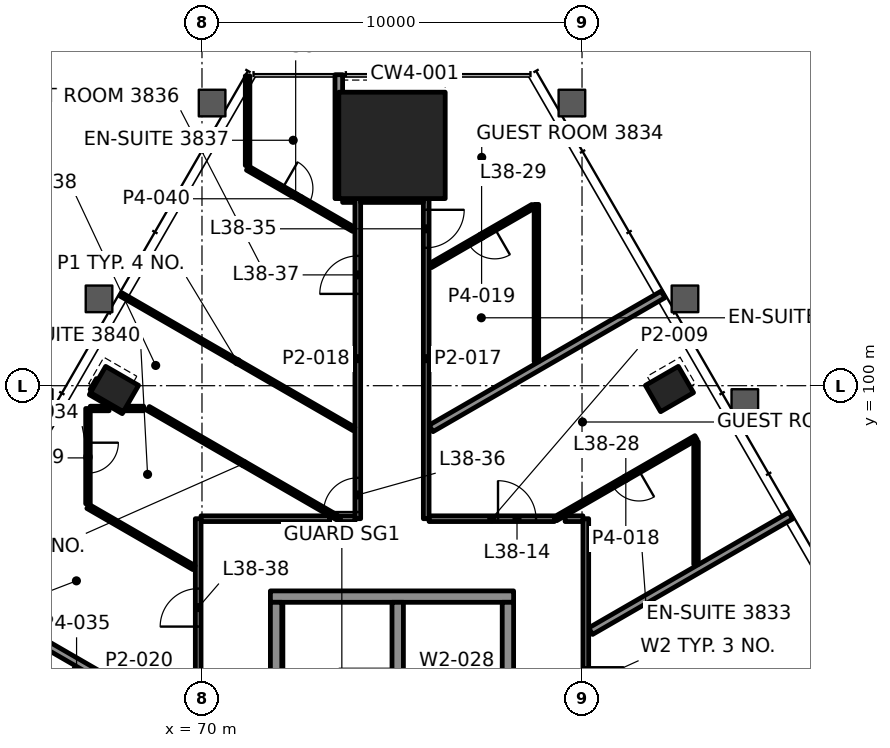
"""IFC4 building model, lengths in metres.
Left out: names, types, materials, properties, quantities, classifications, styles, units other than length and angle.
Written with IfcOpenShell. Run it as: python <this file> out.ifc"""

import sys

from ifc_helpers import new_model, si_unit, direction, frame, frame_2d, origin, origin_2d, place, context, subcontext, project, spatial, rectangle, hollow_rectangle, extrude, element, fill, save


model = new_model("IFC4")
c1 = context("Model", 3, precision=1e-05, world=origin(), true_north=direction((0.0, 1.0)))
c2 = subcontext(c1, "Body", "Model", "MODEL_VIEW")
j1 = project(units=[si_unit("LENGTHUNIT", "METRE"), si_unit("PLANEANGLEUNIT", "RADIAN")], contexts=[c1])
p1 = place(None, origin())
s1 = spatial("IfcSite", under=j1, at=p1, CompositionType="ELEMENT")
p2 = place(p1, origin())
s2 = spatial("IfcBuilding", under=s1, at=p2, CompositionType="ELEMENT")
p3 = place(p2, frame((0.0, 0.0, 167.5)))
s3 = spatial("IfcBuildingStorey", under=s2, at=p3, CompositionType="ELEMENT", Elevation=167.5)
p4 = place(p3, frame((75.0, 106.323, 0.0), z_axis=(0.0, 0.0, 1.0), x_axis=(-1.0, 0.0, 0.0)))
e1 = element("IfcColumn", 1, at=p4, inside=s3, PredefinedType="COLUMN", context=c2, shape_type="SweptSolid", body=[
    extrude(rectangle(XDim=2.8, YDim=2.8, at=origin_2d()), origin(), (0.0, 0.0, 1.0), 3.9),
])
for number, where, z_axis, x_axis in (
    (2, (82.302, 99.912, -0.0), (0.0, 0.0, 1.0), (-0.5, 0.866, 0.0)),
    (3, (67.698, 99.912, -0.0), (0.0, 0.0, 1.0), (-0.5, -0.866, 0.0)),
):
    element("IfcColumn", number, at=place(p3, frame(where, z_axis=z_axis, x_axis=x_axis)), inside=s3, PredefinedType="COLUMN", context=c2, shape_type="SweptSolid", body=[
        extrude(hollow_rectangle(XDim=0.8, YDim=1.0, WallThickness=0.05, at=origin_2d()), origin(), (0.0, 0.0, 1.0), 3.9),
    ])
p5 = place(p3, frame((71.8, 94.45, 0.0), z_axis=(0.0, 0.0, 1.0), x_axis=(1.0, 0.0, 0.0)))
e4 = element("IfcWall", 4, at=p5, inside=s3, PredefinedType="SHEAR", context=c2, shape_type="SweptSolid", body=[
    extrude(rectangle(XDim=6.4, YDim=0.3, at=frame_2d((3.2, 0.0))), origin(), (0.0, 0.0, 1.0), 3.7),
])
for number, where, z_axis, x_axis in (
    (5, (71.95, 88.1, 0.0), (0.0, 0.0, 1.0), (0.0, 1.0, 0.0)),
    (6, (78.05, 88.1, 0.0), (0.0, 0.0, 1.0), (0.0, 1.0, 0.0)),
):
    element("IfcWall", number, at=place(p3, frame(where, z_axis=z_axis, x_axis=x_axis)), inside=s3, PredefinedType="SHEAR", context=c2, shape_type="SweptSolid", body=[
        extrude(rectangle(XDim=6.2, YDim=0.3, at=frame_2d((3.1, 0.0))), origin(), (0.0, 0.0, 1.0), 3.7),
    ])
p6 = place(p3, frame((75.15, 88.1, 0.0), z_axis=(0.0, 0.0, 1.0), x_axis=(0.0, 1.0, 0.0)))
e7 = element("IfcWall", 7, at=p6, inside=s3, PredefinedType="SHEAR", context=c2, shape_type="SweptSolid", body=[
    extrude(rectangle(XDim=6.2, YDim=0.3, at=frame_2d((3.1, 0.0))), origin(), (0.0, 0.0, 1.0), 3.7),
])
p7 = place(p6, frame((0.185, 0.0, 0.0)))
e8 = element("IfcOpeningElement", 8, at=p7, cuts=e7, PredefinedType="OPENING", context=c2, shape_type="SweptSolid", body=[
    extrude(rectangle(XDim=1.0, YDim=2.1, at=frame_2d((0.5, 1.05))), frame((0.0, 0.16, 0.0), z_axis=(0.0, -1.0, 0.0), x_axis=(1.0, 0.0, 0.0)), (0.0, 0.0, 1.0), 0.32),
])
p8 = place(p3, frame((69.975, 96.5, 0.0), z_axis=(0.0, 0.0, 1.0), x_axis=(1.0, 0.0, 0.0)))
e9 = element("IfcWall", 9, at=p8, inside=s3, PredefinedType="PARTITIONING", context=c2, shape_type="SweptSolid", body=[
    extrude(rectangle(XDim=3.384, YDim=0.15, at=frame_2d((1.692, 0.0))), origin(), (0.0, 0.0, 1.0), 3.1),
])
p9 = place(p3, frame((75.975, 96.5, 0.0), z_axis=(0.0, 0.0, 1.0), x_axis=(1.0, 0.0, 0.0)))
e10 = element("IfcWall", 10, at=p9, inside=s3, PredefinedType="PARTITIONING", context=c2, shape_type="SweptSolid", body=[
    extrude(rectangle(XDim=3.299, YDim=0.15, at=frame_2d((1.649, 0.0))), origin(), (0.0, 0.0, 1.0), 3.1),
])
p10 = place(p9, frame((1.814, 0.0, 0.0)))
e11 = element("IfcOpeningElement", 11, at=p10, cuts=e10, PredefinedType="OPENING", context=c2, shape_type="SweptSolid", body=[
    extrude(rectangle(XDim=1.0, YDim=2.1, at=frame_2d((0.5, 1.05))), frame((0.0, 0.085, 0.0), z_axis=(0.0, -1.0, 0.0), x_axis=(1.0, 0.0, 0.0)), (0.0, 0.0, 1.0), 0.17),
])
p11 = place(p3, frame((67.06, 99.4, 0.0), z_axis=(0.0, 0.0, 1.0), x_axis=(1.0, 0.0, 0.0)))
e12 = element("IfcWall", 12, at=p11, inside=s3, PredefinedType="PARTITIONING", context=c2, shape_type="SweptSolid", body=[
    extrude(rectangle(XDim=0.496, YDim=0.12, at=frame_2d((0.248, 0.0))), origin(), (0.0, 0.0, 1.0), 3.022),
])
p12 = place(p3, frame((67.98, 99.4, 0.0), z_axis=(0.0, 0.0, 1.0), x_axis=(1.0, 0.0, 0.0)))
e13 = element("IfcWall", 13, at=p12, inside=s3, PredefinedType="PARTITIONING", context=c2, shape_type="SweptSolid", body=[
    extrude(rectangle(XDim=0.486, YDim=0.12, at=frame_2d((0.243, 0.0))), origin(), (0.0, 0.0, 1.0), 3.1),
])
p13 = place(p3, frame((73.7, 104.923, 0.0), z_axis=(0.0, 0.0, 1.0), x_axis=(1.0, 0.0, 0.0)))
e14 = element("IfcWall", 14, at=p13, inside=s3, PredefinedType="PARTITIONING", context=c2, shape_type="SweptSolid", body=[
    extrude(rectangle(XDim=0.324, YDim=0.2, at=frame_2d((0.162, 0.0))), origin(), (0.0, 0.0, 1.0), 3.1),
])
p14 = place(p3, frame((80.227, 93.541, 0.0), z_axis=(0.0, 0.0, 1.0), x_axis=(0.866033863416, 0.499985347202, 0.0)))
e15 = element("IfcWall", 15, at=p14, inside=s3, PredefinedType="PARTITIONING", context=c2, shape_type="SweptSolid", body=[
    extrude(rectangle(XDim=6.083, YDim=0.2, at=frame_2d((3.042, 0.0))), origin(), (0.0, 0.0, 1.0), 3.022),
])
p15 = place(p3, frame((83.0, 98.634, 0.0), z_axis=(0.0, 0.0, 1.0), x_axis=(-0.866013160285, -0.500021205763, 0.0)))
e16 = element("IfcWall", 16, at=p15, inside=s3, PredefinedType="PARTITIONING", context=c2, shape_type="SweptSolid", body=[
    extrude(rectangle(XDim=4.268, YDim=0.12, at=frame_2d((2.134, 0.0))), origin(), (0.0, 0.0, 1.0), 3.022),
])
p16 = place(p15, frame((1.734, 0.0, 0.0)))
e17 = element("IfcOpeningElement", 17, at=p16, cuts=e16, PredefinedType="OPENING", context=c2, shape_type="SweptSolid", body=[
    extrude(rectangle(XDim=0.8, YDim=2.1, at=frame_2d((0.4, 1.05))), frame((0.0, 0.07, 0.0), z_axis=(0.0, -1.0, 0.0), x_axis=(1.0, 0.0, 0.0)), (0.0, 0.0, 1.0), 0.14),
])
p17 = place(p3, frame((76.027, 98.876, 0.0), z_axis=(0.0, 0.0, 1.0), x_axis=(0.86602299963, 0.500004164094, 0.0)))
e18 = element("IfcWall", 18, at=p17, inside=s3, PredefinedType="PARTITIONING", context=c2, shape_type="SweptSolid", body=[
    extrude(rectangle(XDim=7.052, YDim=0.2, at=frame_2d((3.526, 0.0))), origin(), (0.0, 0.0, 1.0), 3.1),
])
p18 = place(p3, frame((78.705, 104.716, 0.0), z_axis=(0.0, 0.0, 1.0), x_axis=(-0.866028856698, -0.499994019331, 0.0)))
e19 = element("IfcWall", 19, at=p18, inside=s3, PredefinedType="PARTITIONING", context=c2, shape_type="SweptSolid", body=[
    extrude(rectangle(XDim=3.113, YDim=0.12, at=frame_2d((1.556, 0.0))), origin(), (0.0, 0.0, 1.0), 3.1),
])
p19 = place(p18, frame((1.156, 0.0, 0.0)))
e20 = element("IfcOpeningElement", 20, at=p19, cuts=e19, PredefinedType="OPENING", context=c2, shape_type="SweptSolid", body=[
    extrude(rectangle(XDim=0.8, YDim=2.1, at=frame_2d((0.4, 1.05))), frame((0.0, 0.07, 0.0), z_axis=(0.0, -1.0, 0.0), x_axis=(1.0, 0.0, 0.0)), (0.0, 0.0, 1.0), 0.14),
])
p20 = place(p3, frame((67.1, 99.877, 0.0), z_axis=(0.0, 0.0, 1.0), x_axis=(0.500277597875, 0.865865073245, 0.0)))
e21 = element("IfcWall", 21, at=p20, inside=s3, PredefinedType="PARTITIONING", context=c2, shape_type="SweptSolid", body=[
    extrude(rectangle(XDim=0.33, YDim=0.1, at=frame_2d((0.165, 0.0))), origin(), (0.0, 0.0, 1.0), 3.1),
])
p21 = place(p3, frame((83.0, 95.297, 0.0), z_axis=(0.0, 0.0, 1.0), x_axis=(0.0, 1.0, 0.0)))
e22 = element("IfcWall", 22, at=p21, inside=s3, PredefinedType="PARTITIONING", context=c2, shape_type="SweptSolid", body=[
    extrude(rectangle(XDim=3.228, YDim=0.12, at=frame_2d((1.614, 0.0))), origin(), (0.0, 0.0, 1.0), 3.022),
])
p22 = place(p3, frame((80.1, 96.5, 0.0), z_axis=(0.0, 0.0, 1.0), x_axis=(0.0, -1.0, 0.0)))
e23 = element("IfcWall", 23, at=p22, inside=s3, PredefinedType="PARTITIONING", context=c2, shape_type="SweptSolid", body=[
    extrude(rectangle(XDim=10.6, YDim=0.15, at=frame_2d((5.3, 0.0))), origin(), (0.0, 0.0, 1.0), 3.022),
])
p23 = place(p22, frame((3.909, 0.0, 0.0)))
e24 = element("IfcOpeningElement", 24, at=p23, cuts=e23, PredefinedType="OPENING", context=c2, shape_type="SweptSolid", body=[
    extrude(rectangle(XDim=1.0, YDim=2.1, at=frame_2d((0.5, 1.05))), frame((0.0, 0.085, 0.0), z_axis=(0.0, -1.0, 0.0), x_axis=(1.0, 0.0, 0.0)), (0.0, 0.0, 1.0), 0.17),
])
p24 = place(p3, frame((78.8, 100.633, 0.0), z_axis=(0.0, 0.0, 1.0), x_axis=(0.0, 1.0, 0.0)))
e25 = element("IfcWall", 25, at=p24, inside=s3, PredefinedType="PARTITIONING", context=c2, shape_type="SweptSolid", body=[
    extrude(rectangle(XDim=4.137, YDim=0.12, at=frame_2d((2.069, 0.0))), origin(), (0.0, 0.0, 1.0), 3.1),
])
p25 = place(p3, frame((75.9, 104.923, 0.0), z_axis=(0.0, 0.0, 1.0), x_axis=(0.0, -1.0, 0.0)))
e26 = element("IfcWall", 26, at=p25, inside=s3, PredefinedType="PARTITIONING", context=c2, shape_type="SweptSolid", body=[
    extrude(rectangle(XDim=8.423, YDim=0.15, at=frame_2d((4.211, 0.0))), origin(), (0.0, 0.0, 1.0), 3.1),
])
p26 = place(p25, frame((0.294, 0.0, 0.0)))
e27 = element("IfcOpeningElement", 27, at=p26, cuts=e26, PredefinedType="OPENING", context=c2, shape_type="SweptSolid", body=[
    extrude(rectangle(XDim=1.0, YDim=2.1, at=frame_2d((0.5, 1.05))), frame((0.0, 0.085, 0.0), z_axis=(0.0, -1.0, 0.0), x_axis=(1.0, 0.0, 0.0)), (0.0, 0.0, 1.0), 0.17),
])
p27 = place(p3, frame((74.1, 96.5, 0.0), z_axis=(0.0, 0.0, 1.0), x_axis=(0.0, 1.0, 0.0)))
e28 = element("IfcWall", 28, at=p27, inside=s3, PredefinedType="PARTITIONING", context=c2, shape_type="SweptSolid", body=[
    extrude(rectangle(XDim=8.424, YDim=0.15, at=frame_2d((4.212, 0.0))), origin(), (0.0, 0.0, 1.0), 3.1),
])
p28 = place(p27, frame((0.175, 0.0, 0.0)))
e29 = element("IfcOpeningElement", 29, at=p28, cuts=e28, PredefinedType="OPENING", context=c2, shape_type="SweptSolid", body=[
    extrude(rectangle(XDim=0.9, YDim=2.1, at=frame_2d((0.45, 1.05))), frame((0.0, 0.085, 0.0), z_axis=(0.0, -1.0, 0.0), x_axis=(1.0, 0.0, 0.0)), (0.0, 0.0, 1.0), 0.17),
])
p29 = place(p27, frame((5.916, 0.0, 0.0)))
e30 = element("IfcOpeningElement", 30, at=p29, cuts=e28, PredefinedType="OPENING", context=c2, shape_type="SweptSolid", body=[
    extrude(rectangle(XDim=1.0, YDim=2.1, at=frame_2d((0.5, 1.05))), frame((0.0, 0.085, 0.0), z_axis=(0.0, -1.0, 0.0), x_axis=(1.0, 0.0, 0.0)), (0.0, 0.0, 1.0), 0.17),
])
p30 = place(p3, frame((73.6, 104.924, 0.0), z_axis=(0.0, 0.0, 1.0), x_axis=(0.0, 1.0, 0.0)))
e31 = element("IfcWall", 31, at=p30, inside=s3, PredefinedType="PARTITIONING", context=c2, shape_type="SweptSolid", body=[
    extrude(rectangle(XDim=3.26, YDim=0.2, at=frame_2d((1.63, 0.0))), origin(), (0.0, 0.0, 1.0), 3.1),
])
p31 = place(p3, frame((71.2, 105.794, 0.0), z_axis=(0.0, 0.0, 1.0), x_axis=(0.0, 1.0, 0.0)))
e32 = element("IfcWall", 32, at=p31, inside=s3, PredefinedType="PARTITIONING", context=c2, shape_type="SweptSolid", body=[
    extrude(rectangle(XDim=2.36, YDim=0.12, at=frame_2d((1.18, 0.0))), origin(), (0.0, 0.0, 1.0), 3.1),
])
p32 = place(p3, frame((69.9, 85.9, 0.0), z_axis=(0.0, 0.0, 1.0), x_axis=(0.0, 1.0, 0.0)))
e33 = element("IfcWall", 33, at=p32, inside=s3, PredefinedType="PARTITIONING", context=c2, shape_type="SweptSolid", body=[
    extrude(rectangle(XDim=10.6, YDim=0.15, at=frame_2d((5.3, 0.0))), origin(), (0.0, 0.0, 1.0), 3.022),
])
p33 = place(p32, frame((7.76, 0.0, 0.0)))
e34 = element("IfcOpeningElement", 34, at=p33, cuts=e33, PredefinedType="OPENING", context=c2, shape_type="SweptSolid", body=[
    extrude(rectangle(XDim=1.0, YDim=2.1, at=frame_2d((0.5, 1.05))), frame((0.0, 0.085, 0.0), z_axis=(0.0, -1.0, 0.0), x_axis=(1.0, 0.0, 0.0)), (0.0, 0.0, 1.0), 0.17),
])
p34 = place(p3, frame((67.0, 99.4, 0.0), z_axis=(0.0, 0.0, 1.0), x_axis=(0.0, -1.0, 0.0)))
e35 = element("IfcWall", 35, at=p34, inside=s3, PredefinedType="PARTITIONING", context=c2, shape_type="SweptSolid", body=[
    extrude(rectangle(XDim=2.508, YDim=0.12, at=frame_2d((1.254, 0.0))), origin(), (0.0, 0.0, 1.0), 3.022),
])
p35 = place(p34, frame((0.9, 0.0, 0.0)))
e36 = element("IfcOpeningElement", 36, at=p35, cuts=e35, PredefinedType="OPENING", context=c2, shape_type="SweptSolid", body=[
    extrude(rectangle(XDim=0.8, YDim=2.1, at=frame_2d((0.4, 1.05))), frame((0.0, 0.07, 0.0), z_axis=(0.0, -1.0, 0.0), x_axis=(1.0, 0.0, 0.0)), (0.0, 0.0, 1.0), 0.14),
])
p36 = place(p3, frame((66.7, 92.572, 0.0), z_axis=(0.0, 0.0, 1.0), x_axis=(0.0, -1.0, 0.0)))
e37 = element("IfcWall", 37, at=p36, inside=s3, PredefinedType="PARTITIONING", context=c2, shape_type="SweptSolid", body=[
    extrude(rectangle(XDim=2.104, YDim=0.12, at=frame_2d((1.052, 0.0))), origin(), (0.0, 0.0, 1.0), 3.1),
])
p37 = place(p36, frame((0.652, 0.0, 0.0)))
e38 = element("IfcOpeningElement", 38, at=p37, cuts=e37, PredefinedType="OPENING", context=c2, shape_type="SweptSolid", body=[
    extrude(rectangle(XDim=0.8, YDim=2.1, at=frame_2d((0.4, 1.05))), frame((0.0, 0.07, 0.0), z_axis=(0.0, -1.0, 0.0), x_axis=(1.0, 0.0, 0.0)), (0.0, 0.0, 1.0), 0.14),
])
p38 = place(p3, frame((71.2, 105.724, 0.0), z_axis=(0.0, 0.0, 1.0), x_axis=(0.86604299788, -0.499969524894, 0.0)))
e39 = element("IfcWall", 39, at=p38, inside=s3, PredefinedType="PARTITIONING", context=c2, shape_type="SweptSolid", body=[
    extrude(rectangle(XDim=3.222, YDim=0.12, at=frame_2d((1.611, 0.0))), origin(), (0.0, 0.0, 1.0), 3.1),
])
p39 = place(p38, frame((1.061, 0.0, 0.0)))
e40 = element("IfcOpeningElement", 40, at=p39, cuts=e39, PredefinedType="OPENING", context=c2, shape_type="SweptSolid", body=[
    extrude(rectangle(XDim=0.8, YDim=2.1, at=frame_2d((0.4, 1.05))), frame((0.0, 0.07, 0.0), z_axis=(0.0, -1.0, 0.0), x_axis=(1.0, 0.0, 0.0)), (0.0, 0.0, 1.0), 0.14),
])
p40 = place(p3, frame((73.999, 98.862, 0.0), z_axis=(0.0, 0.0, 1.0), x_axis=(-0.866025982437, 0.499998997742, 0.0)))
e41 = element("IfcWall", 41, at=p40, inside=s3, PredefinedType="PARTITIONING", context=c2, shape_type="SweptSolid", body=[
    extrude(rectangle(XDim=7.082, YDim=0.1, at=frame_2d((3.541, 0.0))), origin(), (0.0, 0.0, 1.0), 3.1),
])
p41 = place(p3, frame((73.609, 96.5, 0.0), z_axis=(0.0, 0.0, 1.0), x_axis=(-0.866032775405, 0.499987231761, 0.0)))
e42 = element("IfcWall", 42, at=p41, inside=s3, PredefinedType="PARTITIONING", context=c2, shape_type="SweptSolid", body=[
    extrude(rectangle(XDim=5.8, YDim=0.12, at=frame_2d((2.9, 0.0))), origin(), (0.0, 0.0, 1.0), 3.1),
])
p42 = place(p3, frame((67.932, 99.316, 0.0), z_axis=(0.0, 0.0, 1.0), x_axis=(-0.866010750942, 0.50002537861, 0.0)))
e43 = element("IfcWall", 43, at=p42, inside=s3, PredefinedType="PARTITIONING", context=c2, shape_type="SweptSolid", body=[
    extrude(rectangle(XDim=1.0, YDim=0.12, at=frame_2d((0.5, 0.0))), origin(), (0.0, 0.0, 1.0), 3.022),
])
p43 = place(p3, frame((69.79, 95.212, 0.0), z_axis=(0.0, 0.0, 1.0), x_axis=(-0.86604299788, 0.499969524894, 0.0)))
e44 = element("IfcWall", 44, at=p43, inside=s3, PredefinedType="PARTITIONING", context=c2, shape_type="SweptSolid", body=[
    extrude(rectangle(XDim=3.222, YDim=0.12, at=frame_2d((1.611, 0.0))), origin(), (0.0, 0.0, 1.0), 3.1),
])
p44 = place(p3, frame((69.773, 90.953, 0.0), z_axis=(0.0, 0.0, 1.0), x_axis=(-0.866016371538, 0.500015643983, 0.0)))
e45 = element("IfcWall", 45, at=p44, inside=s3, PredefinedType="PARTITIONING", context=c2, shape_type="SweptSolid", body=[
    extrude(rectangle(XDim=7.376, YDim=0.2, at=frame_2d((3.688, 0.0))), origin(), (0.0, 0.0, 1.0), 3.022),
])
p45 = place(p3, frame((73.639, 96.5, 0.0), z_axis=(0.0, 0.0, 1.0), x_axis=(1.0, 0.0, 0.0)))
e46 = element("IfcWall", 46, at=p45, inside=s3, PredefinedType="PARTITIONING", context=c2, shape_type="SweptSolid", body=[
    extrude(rectangle(XDim=0.386, YDim=0.15, at=frame_2d((0.193, 0.0))), origin(), (0.0, 0.0, 1.0), 3.1),
])
p46 = place(p3, frame((79.555, 96.5, 0.0), z_axis=(0.0, 0.0, 1.0), x_axis=(1.0, 0.0, 0.0)))
e47 = element("IfcWall", 47, at=p46, inside=s3, PredefinedType="PARTITIONING", context=c2, shape_type="SweptSolid", body=[
    extrude(rectangle(XDim=0.47, YDim=0.15, at=frame_2d((0.235, 0.0))), origin(), (0.0, 0.0, 1.0), 3.1),
])
p47 = place(p3, frame((74.175, 104.923, 0.0), z_axis=(0.0, 0.0, 1.0), x_axis=(1.0, 0.0, 0.0)))
e48 = element("IfcWall", 48, at=p47, inside=s3, PredefinedType="PARTITIONING", context=c2, shape_type="SweptSolid", body=[
    extrude(rectangle(XDim=1.649, YDim=0.2, at=frame_2d((0.825, 0.0))), origin(), (0.0, 0.0, 1.0), 3.097),
])
p48 = place(p10, origin())
e49 = element("IfcDoor", 49, at=p48, inside=s3, OperationType="SINGLE_SWING_LEFT", PredefinedType="DOOR", context=c2, shape_type="SweptSolid", body=[
    extrude(rectangle(XDim=1.0, YDim=2.1, at=frame_2d((0.5, 1.05))), frame((0.0, 0.025, 0.0), z_axis=(0.0, -1.0, 0.0), x_axis=(1.0, 0.0, 0.0)), (0.0, 0.0, 1.0), 0.05),
])
fill(e11, e49)
p49 = place(p16, origin())
e50 = element("IfcDoor", 50, at=p49, inside=s3, OperationType="SINGLE_SWING_LEFT", PredefinedType="DOOR", context=c2, shape_type="SweptSolid", body=[
    extrude(rectangle(XDim=0.8, YDim=2.1, at=frame_2d((0.4, 1.05))), frame((0.0, 0.025, 0.0), z_axis=(0.0, -1.0, 0.0), x_axis=(1.0, 0.0, 0.0)), (0.0, 0.0, 1.0), 0.05),
])
fill(e17, e50)
p50 = place(p19, origin())
e51 = element("IfcDoor", 51, at=p50, inside=s3, OperationType="SINGLE_SWING_LEFT", PredefinedType="DOOR", context=c2, shape_type="SweptSolid", body=[
    extrude(rectangle(XDim=0.8, YDim=2.1, at=frame_2d((0.4, 1.05))), frame((0.0, 0.025, 0.0), z_axis=(0.0, -1.0, 0.0), x_axis=(1.0, 0.0, 0.0)), (0.0, 0.0, 1.0), 0.05),
])
fill(e20, e51)
p51 = place(p23, origin())
e52 = element("IfcDoor", 52, at=p51, inside=s3, OperationType="SINGLE_SWING_RIGHT", PredefinedType="DOOR", context=c2, shape_type="SweptSolid", body=[
    extrude(rectangle(XDim=1.0, YDim=2.1, at=frame_2d((0.5, 1.05))), frame((0.0, 0.025, 0.0), z_axis=(0.0, -1.0, 0.0), x_axis=(1.0, 0.0, 0.0)), (0.0, 0.0, 1.0), 0.05),
])
fill(e24, e52)
p52 = place(p26, origin())
e53 = element("IfcDoor", 53, at=p52, inside=s3, OperationType="SINGLE_SWING_RIGHT", PredefinedType="DOOR", context=c2, shape_type="SweptSolid", body=[
    extrude(rectangle(XDim=1.0, YDim=2.1, at=frame_2d((0.5, 1.05))), frame((0.0, 0.025, 0.0), z_axis=(0.0, -1.0, 0.0), x_axis=(1.0, 0.0, 0.0)), (0.0, 0.0, 1.0), 0.05),
])
fill(e27, e53)
p53 = place(p28, origin())
e54 = element("IfcDoor", 54, at=p53, inside=s3, OperationType="SINGLE_SWING_LEFT", PredefinedType="DOOR", context=c2, shape_type="SweptSolid", body=[
    extrude(rectangle(XDim=0.9, YDim=2.1, at=frame_2d((0.45, 1.05))), frame((0.0, 0.025, 0.0), z_axis=(0.0, -1.0, 0.0), x_axis=(1.0, 0.0, 0.0)), (0.0, 0.0, 1.0), 0.05),
])
fill(e29, e54)
p54 = place(p29, origin())
e55 = element("IfcDoor", 55, at=p54, inside=s3, OperationType="SINGLE_SWING_LEFT", PredefinedType="DOOR", context=c2, shape_type="SweptSolid", body=[
    extrude(rectangle(XDim=1.0, YDim=2.1, at=frame_2d((0.5, 1.05))), frame((0.0, 0.025, 0.0), z_axis=(0.0, -1.0, 0.0), x_axis=(1.0, 0.0, 0.0)), (0.0, 0.0, 1.0), 0.05),
])
fill(e30, e55)
p55 = place(p33, origin())
e56 = element("IfcDoor", 56, at=p55, inside=s3, OperationType="SINGLE_SWING_RIGHT", PredefinedType="DOOR", context=c2, shape_type="SweptSolid", body=[
    extrude(rectangle(XDim=1.0, YDim=2.1, at=frame_2d((0.5, 1.05))), frame((0.0, 0.025, 0.0), z_axis=(0.0, -1.0, 0.0), x_axis=(1.0, 0.0, 0.0)), (0.0, 0.0, 1.0), 0.05),
])
fill(e34, e56)
p56 = place(p35, origin())
e57 = element("IfcDoor", 57, at=p56, inside=s3, OperationType="SINGLE_SWING_RIGHT", PredefinedType="DOOR", context=c2, shape_type="SweptSolid", body=[
    extrude(rectangle(XDim=0.8, YDim=2.1, at=frame_2d((0.4, 1.05))), frame((0.0, 0.025, 0.0), z_axis=(0.0, -1.0, 0.0), x_axis=(1.0, 0.0, 0.0)), (0.0, 0.0, 1.0), 0.05),
])
fill(e36, e57)
p57 = place(p39, origin())
e58 = element("IfcDoor", 58, at=p57, inside=s3, OperationType="SINGLE_SWING_LEFT", PredefinedType="DOOR", context=c2, shape_type="SweptSolid", body=[
    extrude(rectangle(XDim=0.8, YDim=2.1, at=frame_2d((0.4, 1.05))), frame((0.0, 0.025, 0.0), z_axis=(0.0, -1.0, 0.0), x_axis=(1.0, 0.0, 0.0)), (0.0, 0.0, 1.0), 0.05),
])
fill(e40, e58)
p58 = place(p3, origin())
p59 = place(p58, frame((86.251, 95.362, 0.15), z_axis=(0.0, 0.0, 1.0), x_axis=(-0.5, 0.866025, 0.0)))
p60 = place(p59, origin())
e59 = element("IfcWindow", 59, at=p60, inside=s3, PartitioningType="SINGLE_PANEL", PredefinedType="WINDOW", context=c2, shape_type="SweptSolid", body=[
    extrude(rectangle(XDim=2.912, YDim=3.55, at=frame_2d((1.456, 1.775))), frame((0.0, 0.03, 0.0), z_axis=(0.0, -1.0, 0.0), x_axis=(1.0, 0.0, 0.0)), (0.0, 0.0, 1.0), 0.06),
])
p61 = place(p58, frame((69.693, 105.658, 0.15), z_axis=(0.0, 0.0, 1.0), x_axis=(-0.5, -0.866025, 0.0)))
p62 = place(p61, origin())
e60 = element("IfcWindow", 60, at=p62, inside=s3, PartitioningType="SINGLE_PANEL", PredefinedType="WINDOW", context=c2, shape_type="SweptSolid", body=[
    extrude(rectangle(XDim=2.912, YDim=3.55, at=frame_2d((1.456, 1.775))), frame((0.0, 0.03, 0.0), z_axis=(0.0, -1.0, 0.0), x_axis=(1.0, 0.0, 0.0)), (0.0, 0.0, 1.0), 0.06),
])
save(model, sys.argv[1])
